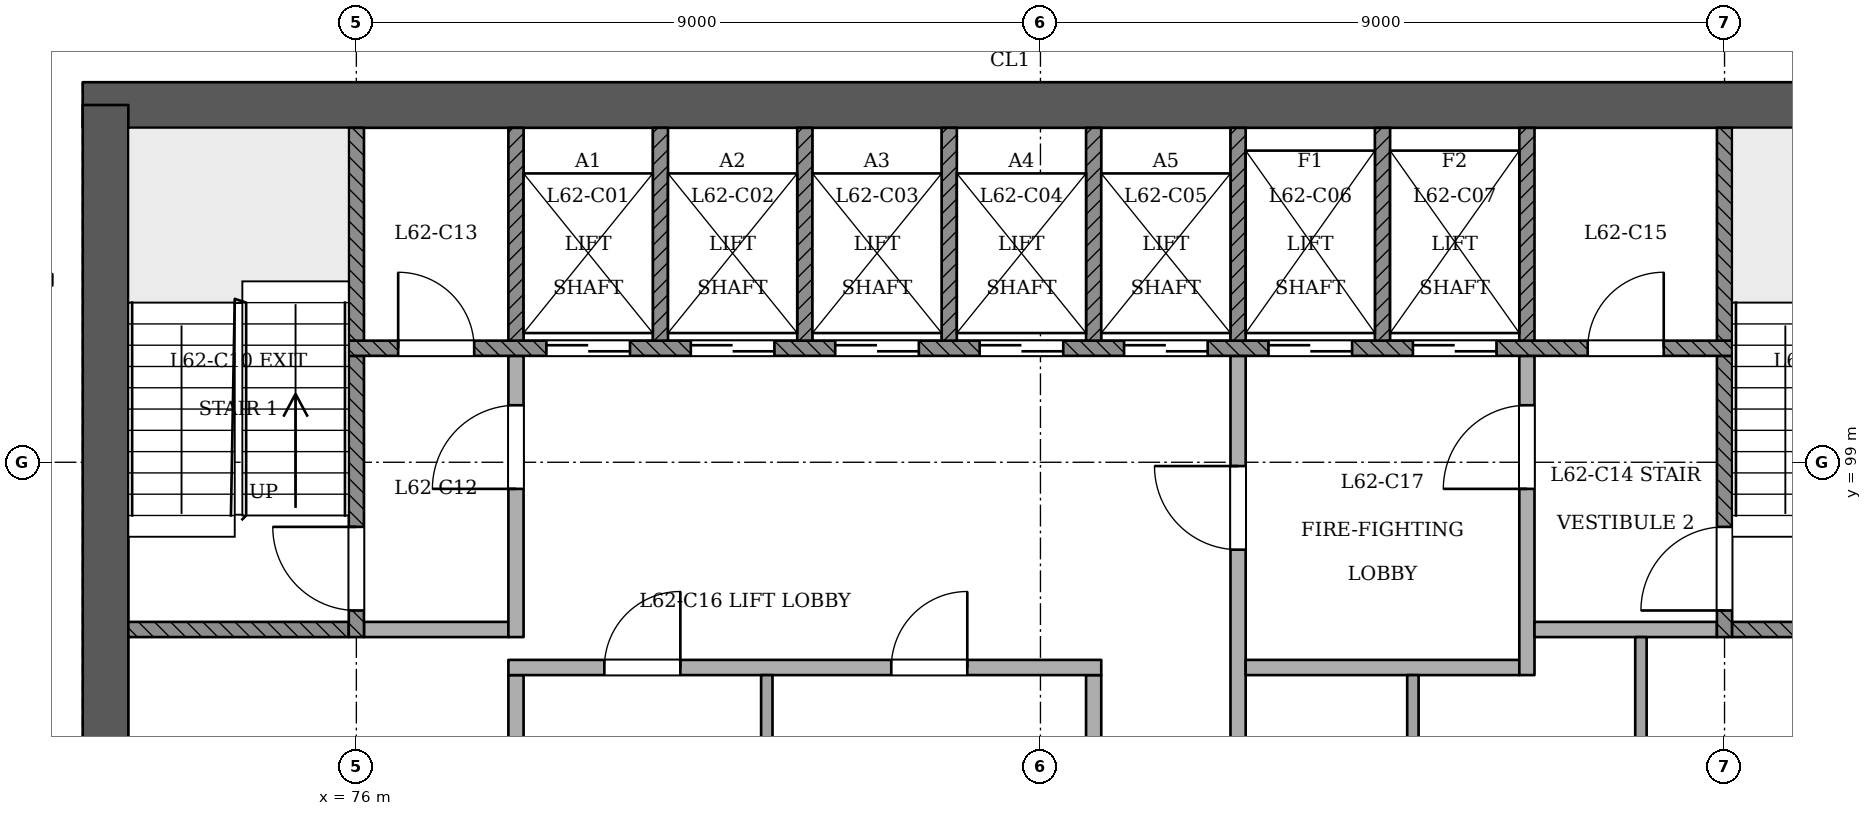
"""IFC4 building model, lengths in metres.
Left out: names, types, materials, properties, quantities, classifications, styles, units other than length and angle.
Written with IfcOpenShell. Run it as: python <this file> out.ifc"""

import sys

from ifc_helpers import new_model, si_unit, direction, frame, frame_2d, origin, place, context, subcontext, project, spatial, rectangle, extrude, element, fill, save


model = new_model("IFC4")
c1 = context("Model", 3, precision=1e-05, world=origin(), true_north=direction((0.0, 1.0)))
c2 = subcontext(c1, "Body", "Model", "MODEL_VIEW")
j1 = project(units=[si_unit("LENGTHUNIT", "METRE"), si_unit("PLANEANGLEUNIT", "RADIAN")], contexts=[c1])
p1 = place(None, origin())
s1 = spatial("IfcSite", under=j1, at=p1, CompositionType="ELEMENT")
p2 = place(p1, origin())
s2 = spatial("IfcBuilding", under=s1, at=p2, CompositionType="ELEMENT")
p3 = place(p2, frame((0.0, 0.0, 242.8)))
s3 = spatial("IfcBuildingStorey", under=s2, at=p3, CompositionType="ELEMENT", Elevation=242.8)
p4 = place(p3, frame((97.3, 103.7, 0.0), z_axis=(0.0, 0.0, 1.0), x_axis=(-1.0, 0.0, 0.0)))
e1 = element("IfcWall", 1, at=p4, inside=s3, PredefinedType="SHEAR", context=c2, shape_type="SweptSolid", body=[
    extrude(rectangle(XDim=24.9, YDim=0.6, at=frame_2d((12.45, 0.0))), origin(), (0.0, 0.0, 1.0), 3.6),
])
p5 = place(p3, frame((72.7, 103.7, 0.0), z_axis=(0.0, 0.0, 1.0), x_axis=(0.0, -1.0, 0.0)))
e2 = element("IfcWall", 2, at=p5, inside=s3, PredefinedType="SHEAR", context=c2, shape_type="SweptSolid", body=[
    extrude(rectangle(XDim=10.9, YDim=0.6, at=frame_2d((5.45, 0.0))), origin(), (0.0, 0.0, 1.0), 3.6),
])
p6 = place(p3, frame((72.0, 101.4, 0.0), z_axis=(0.0, 0.0, 1.0), x_axis=(-1.0, 0.0, 0.0)))
e3 = element("IfcWall", 3, at=p6, inside=s3, PredefinedType="PARTITIONING", context=c2, shape_type="SweptSolid", body=[
    extrude(rectangle(XDim=1.8, YDim=0.15, at=frame_2d((0.9, 0.0))), origin(), (0.0, 0.0, 1.0), 3.2),
])
p7 = place(p6, frame((0.566, 0.0, 0.0)))
e4 = element("IfcOpeningElement", 4, at=p7, cuts=e3, PredefinedType="OPENING", context=c2, shape_type="SweptSolid", body=[
    extrude(rectangle(XDim=1.0, YDim=2.1, at=frame_2d((0.5, 1.05))), frame((0.0, 0.085, 0.0), z_axis=(0.0, -1.0, 0.0), x_axis=(1.0, 0.0, 0.0)), (0.0, 0.0, 1.0), 0.171),
])
p8 = place(p3, frame((78.1, 93.4, 0.0), z_axis=(0.0, 0.0, 1.0), x_axis=(0.0, 1.0, 0.0)))
e5 = element("IfcWall", 5, at=p8, inside=s3, PredefinedType="PARTITIONING", context=c2, shape_type="SweptSolid", body=[
    extrude(rectangle(XDim=2.8, YDim=0.2, at=frame_2d((1.4, 0.0))), origin(), (0.0, 0.0, 1.0), 3.2),
])
p9 = place(p3, frame((81.4, 93.4, 0.0), z_axis=(0.0, 0.0, 1.0), x_axis=(0.0, 1.0, 0.0)))
e6 = element("IfcWall", 6, at=p9, inside=s3, PredefinedType="PARTITIONING", context=c2, shape_type="SweptSolid", body=[
    extrude(rectangle(XDim=2.8, YDim=0.15, at=frame_2d((1.4, 0.0))), origin(), (0.0, 0.0, 1.0), 3.2),
])
p10 = place(p3, frame((85.7, 93.4, 0.0), z_axis=(0.0, 0.0, 1.0), x_axis=(0.0, 1.0, 0.0)))
e7 = element("IfcWall", 7, at=p10, inside=s3, PredefinedType="PARTITIONING", context=c2, shape_type="SweptSolid", body=[
    extrude(rectangle(XDim=2.8, YDim=0.2, at=frame_2d((1.4, 0.0))), origin(), (0.0, 0.0, 1.0), 3.2),
])
p11 = place(p3, frame((87.6, 93.4, 0.0), z_axis=(0.0, 0.0, 1.0), x_axis=(0.0, 1.0, 0.0)))
e8 = element("IfcWall", 8, at=p11, inside=s3, PredefinedType="PARTITIONING", context=c2, shape_type="SweptSolid", body=[
    extrude(rectangle(XDim=7.0, YDim=0.2, at=frame_2d((3.5, 0.0))), origin(), (0.0, 0.0, 1.0), 3.2),
])
p12 = place(p11, frame((4.45, 0.0, 0.0)))
e9 = element("IfcOpeningElement", 9, at=p12, cuts=e8, PredefinedType="OPENING", context=c2, shape_type="SweptSolid", body=[
    extrude(rectangle(XDim=1.1, YDim=2.1, at=frame_2d((0.55, 1.05))), frame((0.0, 0.11, 0.0), z_axis=(0.0, -1.0, 0.0), x_axis=(1.0, 0.0, 0.0)), (0.0, 0.0, 1.0), 0.221),
])
p13 = place(p3, frame((89.9, 93.4, 0.0), z_axis=(0.0, 0.0, 1.0), x_axis=(0.0, 1.0, 0.0)))
e10 = element("IfcWall", 10, at=p13, inside=s3, PredefinedType="PARTITIONING", context=c2, shape_type="SweptSolid", body=[
    extrude(rectangle(XDim=2.8, YDim=0.15, at=frame_2d((1.4, 0.0))), origin(), (0.0, 0.0, 1.0), 3.2),
])
p14 = place(p3, frame((92.9, 93.4, 0.0), z_axis=(0.0, 0.0, 1.0), x_axis=(0.0, 1.0, 0.0)))
e11 = element("IfcWall", 11, at=p14, inside=s3, PredefinedType="PARTITIONING", context=c2, shape_type="SweptSolid", body=[
    extrude(rectangle(XDim=3.3, YDim=0.15, at=frame_2d((1.65, 0.0))), origin(), (0.0, 0.0, 1.0), 3.2),
])
p15 = place(p3, frame((78.0, 96.3, 0.0), z_axis=(0.0, 0.0, 1.0), x_axis=(1.0, 0.0, 0.0)))
e12 = element("IfcWall", 12, at=p15, inside=s3, PredefinedType="PARTITIONING", context=c2, shape_type="SweptSolid", body=[
    extrude(rectangle(XDim=7.8, YDim=0.2, at=frame_2d((3.9, 0.0))), origin(), (0.0, 0.0, 1.0), 3.2),
])
p16 = place(p15, frame((1.262, 0.0, 0.0)))
e13 = element("IfcOpeningElement", 13, at=p16, cuts=e12, PredefinedType="OPENING", context=c2, shape_type="SweptSolid", body=[
    extrude(rectangle(XDim=1.0, YDim=2.1, at=frame_2d((0.5, 1.05))), frame((0.0, 0.11, 0.0), z_axis=(0.0, -1.0, 0.0), x_axis=(1.0, 0.0, 0.0)), (0.0, 0.0, 1.0), 0.221),
])
p17 = place(p15, frame((5.038, 0.0, 0.0)))
e14 = element("IfcOpeningElement", 14, at=p17, cuts=e12, PredefinedType="OPENING", context=c2, shape_type="SweptSolid", body=[
    extrude(rectangle(XDim=1.0, YDim=2.1, at=frame_2d((0.5, 1.05))), frame((0.0, 0.11, 0.0), z_axis=(0.0, -1.0, 0.0), x_axis=(1.0, 0.0, 0.0)), (0.0, 0.0, 1.0), 0.221),
])
p18 = place(p3, frame((87.7, 96.3, 0.0), z_axis=(0.0, 0.0, 1.0), x_axis=(1.0, 0.0, 0.0)))
e15 = element("IfcWall", 15, at=p18, inside=s3, PredefinedType="PARTITIONING", context=c2, shape_type="SweptSolid", body=[
    extrude(rectangle(XDim=3.6, YDim=0.2, at=frame_2d((1.8, 0.0))), origin(), (0.0, 0.0, 1.0), 3.2),
])
p19 = place(p3, frame((91.4, 96.2, 0.0), z_axis=(0.0, 0.0, 1.0), x_axis=(0.0, 1.0, 0.0)))
e16 = element("IfcWall", 16, at=p19, inside=s3, PredefinedType="PARTITIONING", context=c2, shape_type="SweptSolid", body=[
    extrude(rectangle(XDim=4.2, YDim=0.2, at=frame_2d((2.1, 0.0))), origin(), (0.0, 0.0, 1.0), 3.2),
])
p20 = place(p19, frame((2.45, 0.0, 0.0)))
e17 = element("IfcOpeningElement", 17, at=p20, cuts=e16, PredefinedType="OPENING", context=c2, shape_type="SweptSolid", body=[
    extrude(rectangle(XDim=1.1, YDim=2.1, at=frame_2d((0.55, 1.05))), frame((0.0, 0.11, 0.0), z_axis=(0.0, -1.0, 0.0), x_axis=(1.0, 0.0, 0.0)), (0.0, 0.0, 1.0), 0.221),
])
p21 = place(p3, frame((73.0, 96.8, 0.0), z_axis=(0.0, 0.0, 1.0), x_axis=(1.0, 0.0, 0.0)))
e18 = element("IfcWall", 18, at=p21, inside=s3, PredefinedType="SOLIDWALL", context=c2, shape_type="SweptSolid", body=[
    extrude(rectangle(XDim=2.9, YDim=0.2, at=frame_2d((1.45, 0.0))), origin(), (0.0, 0.0, 1.0), 3.2),
])
p22 = place(p3, frame((76.0, 96.7, 0.0), z_axis=(0.0, 0.0, 1.0), x_axis=(0.0, 1.0, 0.0)))
e19 = element("IfcWall", 19, at=p22, inside=s3, PredefinedType="SOLIDWALL", context=c2, shape_type="SweptSolid", body=[
    extrude(rectangle(XDim=3.7, YDim=0.2, at=frame_2d((1.85, 0.0))), origin(), (0.0, 0.0, 1.0), 3.2),
])
p23 = place(p22, frame((0.35, 0.0, 0.0)))
e20 = element("IfcOpeningElement", 20, at=p23, cuts=e19, PredefinedType="OPENING", context=c2, shape_type="SweptSolid", body=[
    extrude(rectangle(XDim=1.1, YDim=2.1, at=frame_2d((0.55, 1.05))), frame((0.0, 0.11, 0.0), z_axis=(0.0, -1.0, 0.0), x_axis=(1.0, 0.0, 0.0)), (0.0, 0.0, 1.0), 0.221),
])
p24 = place(p3, frame((76.1, 96.8, 0.0), z_axis=(0.0, 0.0, 1.0), x_axis=(1.0, 0.0, 0.0)))
e21 = element("IfcWall", 21, at=p24, inside=s3, PredefinedType="PARTITIONING", context=c2, shape_type="SweptSolid", body=[
    extrude(rectangle(XDim=1.9, YDim=0.2, at=frame_2d((0.95, 0.0))), origin(), (0.0, 0.0, 1.0), 3.2),
])
p25 = place(p3, frame((78.1, 96.7, 0.0), z_axis=(0.0, 0.0, 1.0), x_axis=(0.0, 1.0, 0.0)))
e22 = element("IfcWall", 22, at=p25, inside=s3, PredefinedType="PARTITIONING", context=c2, shape_type="SweptSolid", body=[
    extrude(rectangle(XDim=3.7, YDim=0.2, at=frame_2d((1.85, 0.0))), origin(), (0.0, 0.0, 1.0), 3.2),
])
p26 = place(p25, frame((1.95, 0.0, 0.0)))
e23 = element("IfcOpeningElement", 23, at=p26, cuts=e22, PredefinedType="OPENING", context=c2, shape_type="SweptSolid", body=[
    extrude(rectangle(XDim=1.1, YDim=2.1, at=frame_2d((0.55, 1.05))), frame((0.0, 0.11, 0.0), z_axis=(0.0, -1.0, 0.0), x_axis=(1.0, 0.0, 0.0)), (0.0, 0.0, 1.0), 0.221),
])
p27 = place(p3, frame((91.5, 96.8, 0.0), z_axis=(0.0, 0.0, 1.0), x_axis=(1.0, 0.0, 0.0)))
e24 = element("IfcWall", 24, at=p27, inside=s3, PredefinedType="PARTITIONING", context=c2, shape_type="SweptSolid", body=[
    extrude(rectangle(XDim=2.4, YDim=0.2, at=frame_2d((1.2, 0.0))), origin(), (0.0, 0.0, 1.0), 3.2),
])
p28 = place(p3, frame((94.0, 96.7, 0.0), z_axis=(0.0, 0.0, 1.0), x_axis=(0.0, 1.0, 0.0)))
e25 = element("IfcWall", 25, at=p28, inside=s3, PredefinedType="SOLIDWALL", context=c2, shape_type="SweptSolid", body=[
    extrude(rectangle(XDim=3.7, YDim=0.2, at=frame_2d((1.85, 0.0))), origin(), (0.0, 0.0, 1.0), 3.2),
])
p29 = place(p28, frame((0.35, 0.0, 0.0)))
e26 = element("IfcOpeningElement", 26, at=p29, cuts=e25, PredefinedType="OPENING", context=c2, shape_type="SweptSolid", body=[
    extrude(rectangle(XDim=1.1, YDim=2.1, at=frame_2d((0.55, 1.05))), frame((0.0, 0.11, 0.0), z_axis=(0.0, -1.0, 0.0), x_axis=(1.0, 0.0, 0.0)), (0.0, 0.0, 1.0), 0.221),
])
p30 = place(p3, frame((94.1, 96.8, 0.0), z_axis=(0.0, 0.0, 1.0), x_axis=(1.0, 0.0, 0.0)))
e27 = element("IfcWall", 27, at=p30, inside=s3, PredefinedType="SOLIDWALL", context=c2, shape_type="SweptSolid", body=[
    extrude(rectangle(XDim=2.9, YDim=0.2, at=frame_2d((1.45, 0.0))), origin(), (0.0, 0.0, 1.0), 3.2),
])
p31 = place(p3, frame((75.9, 100.5, 0.0), z_axis=(0.0, 0.0, 1.0), x_axis=(1.0, 0.0, 0.0)))
e28 = element("IfcWall", 28, at=p31, inside=s3, PredefinedType="SOLIDWALL", context=c2, shape_type="SweptSolid", body=[
    extrude(rectangle(XDim=18.2, YDim=0.2, at=frame_2d((9.1, 0.0))), origin(), (0.0, 0.0, 1.0), 3.2),
])
p32 = place(p31, frame((2.6, 0.0, 0.0)))
e29 = element("IfcOpeningElement", 29, at=p32, cuts=e28, PredefinedType="OPENING", context=c2, shape_type="SweptSolid", body=[
    extrude(rectangle(XDim=1.1, YDim=2.1, at=frame_2d((0.55, 1.05))), frame((0.0, 0.11, 0.0), z_axis=(0.0, -1.0, 0.0), x_axis=(1.0, 0.0, 0.0)), (0.0, 0.0, 1.0), 0.221),
])
p33 = place(p31, frame((4.5, 0.0, 0.0)))
e30 = element("IfcOpeningElement", 30, at=p33, cuts=e28, PredefinedType="OPENING", context=c2, shape_type="SweptSolid", body=[
    extrude(rectangle(XDim=1.1, YDim=2.1, at=frame_2d((0.55, 1.05))), frame((0.0, 0.11, 0.0), z_axis=(0.0, -1.0, 0.0), x_axis=(1.0, 0.0, 0.0)), (0.0, 0.0, 1.0), 0.221),
])
p34 = place(p31, frame((6.4, 0.0, 0.0)))
e31 = element("IfcOpeningElement", 31, at=p34, cuts=e28, PredefinedType="OPENING", context=c2, shape_type="SweptSolid", body=[
    extrude(rectangle(XDim=1.1, YDim=2.1, at=frame_2d((0.55, 1.05))), frame((0.0, 0.11, 0.0), z_axis=(0.0, -1.0, 0.0), x_axis=(1.0, 0.0, 0.0)), (0.0, 0.0, 1.0), 0.221),
])
p35 = place(p31, frame((8.3, 0.0, 0.0)))
e32 = element("IfcOpeningElement", 32, at=p35, cuts=e28, PredefinedType="OPENING", context=c2, shape_type="SweptSolid", body=[
    extrude(rectangle(XDim=1.1, YDim=2.1, at=frame_2d((0.55, 1.05))), frame((0.0, 0.11, 0.0), z_axis=(0.0, -1.0, 0.0), x_axis=(1.0, 0.0, 0.0)), (0.0, 0.0, 1.0), 0.221),
])
p36 = place(p31, frame((10.2, 0.0, 0.0)))
e33 = element("IfcOpeningElement", 33, at=p36, cuts=e28, PredefinedType="OPENING", context=c2, shape_type="SweptSolid", body=[
    extrude(rectangle(XDim=1.1, YDim=2.1, at=frame_2d((0.55, 1.05))), frame((0.0, 0.11, 0.0), z_axis=(0.0, -1.0, 0.0), x_axis=(1.0, 0.0, 0.0)), (0.0, 0.0, 1.0), 0.221),
])
p37 = place(p31, frame((12.1, 0.0, 0.0)))
e34 = element("IfcOpeningElement", 34, at=p37, cuts=e28, PredefinedType="OPENING", context=c2, shape_type="SweptSolid", body=[
    extrude(rectangle(XDim=1.1, YDim=2.1, at=frame_2d((0.55, 1.05))), frame((0.0, 0.11, 0.0), z_axis=(0.0, -1.0, 0.0), x_axis=(1.0, 0.0, 0.0)), (0.0, 0.0, 1.0), 0.221),
])
p38 = place(p31, frame((14.0, 0.0, 0.0)))
e35 = element("IfcOpeningElement", 35, at=p38, cuts=e28, PredefinedType="OPENING", context=c2, shape_type="SweptSolid", body=[
    extrude(rectangle(XDim=1.1, YDim=2.1, at=frame_2d((0.55, 1.05))), frame((0.0, 0.11, 0.0), z_axis=(0.0, -1.0, 0.0), x_axis=(1.0, 0.0, 0.0)), (0.0, 0.0, 1.0), 0.221),
])
p39 = place(p31, frame((0.65, 0.0, 0.0)))
e36 = element("IfcOpeningElement", 36, at=p39, cuts=e28, PredefinedType="OPENING", context=c2, shape_type="SweptSolid", body=[
    extrude(rectangle(XDim=1.0, YDim=2.1, at=frame_2d((0.5, 1.05))), frame((0.0, 0.11, 0.0), z_axis=(0.0, -1.0, 0.0), x_axis=(1.0, 0.0, 0.0)), (0.0, 0.0, 1.0), 0.221),
])
p40 = place(p31, frame((16.3, 0.0, 0.0)))
e37 = element("IfcOpeningElement", 37, at=p40, cuts=e28, PredefinedType="OPENING", context=c2, shape_type="SweptSolid", body=[
    extrude(rectangle(XDim=1.0, YDim=2.1, at=frame_2d((0.5, 1.05))), frame((0.0, 0.11, 0.0), z_axis=(0.0, -1.0, 0.0), x_axis=(1.0, 0.0, 0.0)), (0.0, 0.0, 1.0), 0.221),
])
for number, where, z_axis, x_axis in (
    (38, (76.0, 100.6, 0.0), (0.0, 0.0, 1.0), (0.0, 1.0, 0.0)),
    (39, (78.1, 100.6, 0.0), (0.0, 0.0, 1.0), (0.0, 1.0, 0.0)),
    (40, (80.0, 100.6, 0.0), (0.0, 0.0, 1.0), (0.0, 1.0, 0.0)),
    (41, (81.9, 100.6, 0.0), (0.0, 0.0, 1.0), (0.0, 1.0, 0.0)),
    (42, (83.8, 100.6, 0.0), (0.0, 0.0, 1.0), (0.0, 1.0, 0.0)),
    (43, (85.7, 100.6, 0.0), (0.0, 0.0, 1.0), (0.0, 1.0, 0.0)),
    (44, (87.6, 100.6, 0.0), (0.0, 0.0, 1.0), (0.0, 1.0, 0.0)),
    (45, (89.5, 100.6, 0.0), (0.0, 0.0, 1.0), (0.0, 1.0, 0.0)),
    (46, (91.4, 100.6, 0.0), (0.0, 0.0, 1.0), (0.0, 1.0, 0.0)),
    (47, (94.0, 100.6, 0.0), (0.0, 0.0, 1.0), (0.0, 1.0, 0.0)),
):
    element("IfcWall", number, at=place(p3, frame(where, z_axis=z_axis, x_axis=x_axis)), inside=s3, PredefinedType="SOLIDWALL", context=c2, shape_type="SweptSolid", body=[
        extrude(rectangle(XDim=2.8, YDim=0.2, at=frame_2d((1.4, 0.0))), origin(), (0.0, 0.0, 1.0), 3.2),
    ])
p41 = place(p32, origin())
e48 = element("IfcDoor", 48, at=p41, inside=s3, OperationType="SLIDING_TO_RIGHT", PredefinedType="NOTDEFINED", context=c2, shape_type="SweptSolid", body=[
    extrude(rectangle(XDim=1.1, YDim=2.1, at=frame_2d((0.55, 1.05))), frame((0.0, 0.025, 0.0), z_axis=(0.0, -1.0, 0.0), x_axis=(1.0, 0.0, 0.0)), (0.0, 0.0, 1.0), 0.05),
])
fill(e29, e48)
p42 = place(p33, origin())
e49 = element("IfcDoor", 49, at=p42, inside=s3, OperationType="SLIDING_TO_LEFT", PredefinedType="NOTDEFINED", context=c2, shape_type="SweptSolid", body=[
    extrude(rectangle(XDim=1.1, YDim=2.1, at=frame_2d((0.55, 1.05))), frame((0.0, 0.025, 0.0), z_axis=(0.0, -1.0, 0.0), x_axis=(1.0, 0.0, 0.0)), (0.0, 0.0, 1.0), 0.05),
])
fill(e30, e49)
p43 = place(p34, origin())
e50 = element("IfcDoor", 50, at=p43, inside=s3, OperationType="SLIDING_TO_RIGHT", PredefinedType="NOTDEFINED", context=c2, shape_type="SweptSolid", body=[
    extrude(rectangle(XDim=1.1, YDim=2.1, at=frame_2d((0.55, 1.05))), frame((0.0, 0.025, 0.0), z_axis=(0.0, -1.0, 0.0), x_axis=(1.0, 0.0, 0.0)), (0.0, 0.0, 1.0), 0.05),
])
fill(e31, e50)
p44 = place(p35, origin())
e51 = element("IfcDoor", 51, at=p44, inside=s3, OperationType="SLIDING_TO_LEFT", PredefinedType="NOTDEFINED", context=c2, shape_type="SweptSolid", body=[
    extrude(rectangle(XDim=1.1, YDim=2.1, at=frame_2d((0.55, 1.05))), frame((0.0, 0.025, 0.0), z_axis=(0.0, -1.0, 0.0), x_axis=(1.0, 0.0, 0.0)), (0.0, 0.0, 1.0), 0.05),
])
fill(e32, e51)
p45 = place(p36, origin())
e52 = element("IfcDoor", 52, at=p45, inside=s3, OperationType="SLIDING_TO_RIGHT", PredefinedType="NOTDEFINED", context=c2, shape_type="SweptSolid", body=[
    extrude(rectangle(XDim=1.1, YDim=2.1, at=frame_2d((0.55, 1.05))), frame((0.0, 0.025, 0.0), z_axis=(0.0, -1.0, 0.0), x_axis=(1.0, 0.0, 0.0)), (0.0, 0.0, 1.0), 0.05),
])
fill(e33, e52)
p46 = place(p37, origin())
e53 = element("IfcDoor", 53, at=p46, inside=s3, OperationType="SLIDING_TO_RIGHT", PredefinedType="NOTDEFINED", context=c2, shape_type="SweptSolid", body=[
    extrude(rectangle(XDim=1.1, YDim=2.1, at=frame_2d((0.55, 1.05))), frame((0.0, 0.025, 0.0), z_axis=(0.0, -1.0, 0.0), x_axis=(1.0, 0.0, 0.0)), (0.0, 0.0, 1.0), 0.05),
])
fill(e34, e53)
p47 = place(p38, origin())
e54 = element("IfcDoor", 54, at=p47, inside=s3, OperationType="SLIDING_TO_LEFT", PredefinedType="NOTDEFINED", context=c2, shape_type="SweptSolid", body=[
    extrude(rectangle(XDim=1.1, YDim=2.1, at=frame_2d((0.55, 1.05))), frame((0.0, 0.025, 0.0), z_axis=(0.0, -1.0, 0.0), x_axis=(1.0, 0.0, 0.0)), (0.0, 0.0, 1.0), 0.05),
])
fill(e35, e54)
p48 = place(p23, origin())
e55 = element("IfcDoor", 55, at=p48, inside=s3, OperationType="SINGLE_SWING_RIGHT", PredefinedType="NOTDEFINED", context=c2, shape_type="SweptSolid", body=[
    extrude(rectangle(XDim=1.1, YDim=2.1, at=frame_2d((0.55, 1.05))), frame((0.0, 0.025, 0.0), z_axis=(0.0, -1.0, 0.0), x_axis=(1.0, 0.0, 0.0)), (0.0, 0.0, 1.0), 0.05),
])
fill(e20, e55)
p49 = place(p29, origin())
e56 = element("IfcDoor", 56, at=p49, inside=s3, OperationType="SINGLE_SWING_LEFT", PredefinedType="NOTDEFINED", context=c2, shape_type="SweptSolid", body=[
    extrude(rectangle(XDim=1.1, YDim=2.1, at=frame_2d((0.55, 1.05))), frame((0.0, 0.025, 0.0), z_axis=(0.0, -1.0, 0.0), x_axis=(1.0, 0.0, 0.0)), (0.0, 0.0, 1.0), 0.05),
])
fill(e26, e56)
p50 = place(p26, origin())
e57 = element("IfcDoor", 57, at=p50, inside=s3, OperationType="SINGLE_SWING_LEFT", PredefinedType="NOTDEFINED", context=c2, shape_type="SweptSolid", body=[
    extrude(rectangle(XDim=1.1, YDim=2.1, at=frame_2d((0.55, 1.05))), frame((0.0, 0.025, 0.0), z_axis=(0.0, -1.0, 0.0), x_axis=(1.0, 0.0, 0.0)), (0.0, 0.0, 1.0), 0.05),
])
fill(e23, e57)
p51 = place(p12, origin())
e58 = element("IfcDoor", 58, at=p51, inside=s3, OperationType="SINGLE_SWING_RIGHT", PredefinedType="NOTDEFINED", context=c2, shape_type="SweptSolid", body=[
    extrude(rectangle(XDim=1.1, YDim=2.1, at=frame_2d((0.55, 1.05))), frame((0.0, 0.025, 0.0), z_axis=(0.0, -1.0, 0.0), x_axis=(1.0, 0.0, 0.0)), (0.0, 0.0, 1.0), 0.05),
])
fill(e9, e58)
p52 = place(p20, origin())
e59 = element("IfcDoor", 59, at=p52, inside=s3, OperationType="SINGLE_SWING_LEFT", PredefinedType="NOTDEFINED", context=c2, shape_type="SweptSolid", body=[
    extrude(rectangle(XDim=1.1, YDim=2.1, at=frame_2d((0.55, 1.05))), frame((0.0, 0.025, 0.0), z_axis=(0.0, -1.0, 0.0), x_axis=(1.0, 0.0, 0.0)), (0.0, 0.0, 1.0), 0.05),
])
fill(e17, e59)
p53 = place(p39, origin())
e60 = element("IfcDoor", 60, at=p53, inside=s3, OperationType="SINGLE_SWING_LEFT", PredefinedType="NOTDEFINED", context=c2, shape_type="SweptSolid", body=[
    extrude(rectangle(XDim=1.0, YDim=2.1, at=frame_2d((0.5, 1.05))), frame((0.0, 0.025, 0.0), z_axis=(0.0, -1.0, 0.0), x_axis=(1.0, 0.0, 0.0)), (0.0, 0.0, 1.0), 0.05),
])
fill(e36, e60)
p54 = place(p40, origin())
e61 = element("IfcDoor", 61, at=p54, inside=s3, OperationType="SINGLE_SWING_RIGHT", PredefinedType="NOTDEFINED", context=c2, shape_type="SweptSolid", body=[
    extrude(rectangle(XDim=1.0, YDim=2.1, at=frame_2d((0.5, 1.05))), frame((0.0, 0.025, 0.0), z_axis=(0.0, -1.0, 0.0), x_axis=(1.0, 0.0, 0.0)), (0.0, 0.0, 1.0), 0.05),
])
fill(e37, e61)
p55 = place(p16, origin())
e62 = element("IfcDoor", 62, at=p55, inside=s3, OperationType="SINGLE_SWING_RIGHT", PredefinedType="NOTDEFINED", context=c2, shape_type="SweptSolid", body=[
    extrude(rectangle(XDim=1.0, YDim=2.1, at=frame_2d((0.5, 1.05))), frame((0.0, 0.025, 0.0), z_axis=(0.0, -1.0, 0.0), x_axis=(1.0, 0.0, 0.0)), (0.0, 0.0, 1.0), 0.05),
])
fill(e13, e62)
p56 = place(p17, origin())
e63 = element("IfcDoor", 63, at=p56, inside=s3, OperationType="SINGLE_SWING_RIGHT", PredefinedType="NOTDEFINED", context=c2, shape_type="SweptSolid", body=[
    extrude(rectangle(XDim=1.0, YDim=2.1, at=frame_2d((0.5, 1.05))), frame((0.0, 0.025, 0.0), z_axis=(0.0, -1.0, 0.0), x_axis=(1.0, 0.0, 0.0)), (0.0, 0.0, 1.0), 0.05),
])
fill(e14, e63)
save(model, sys.argv[1])
